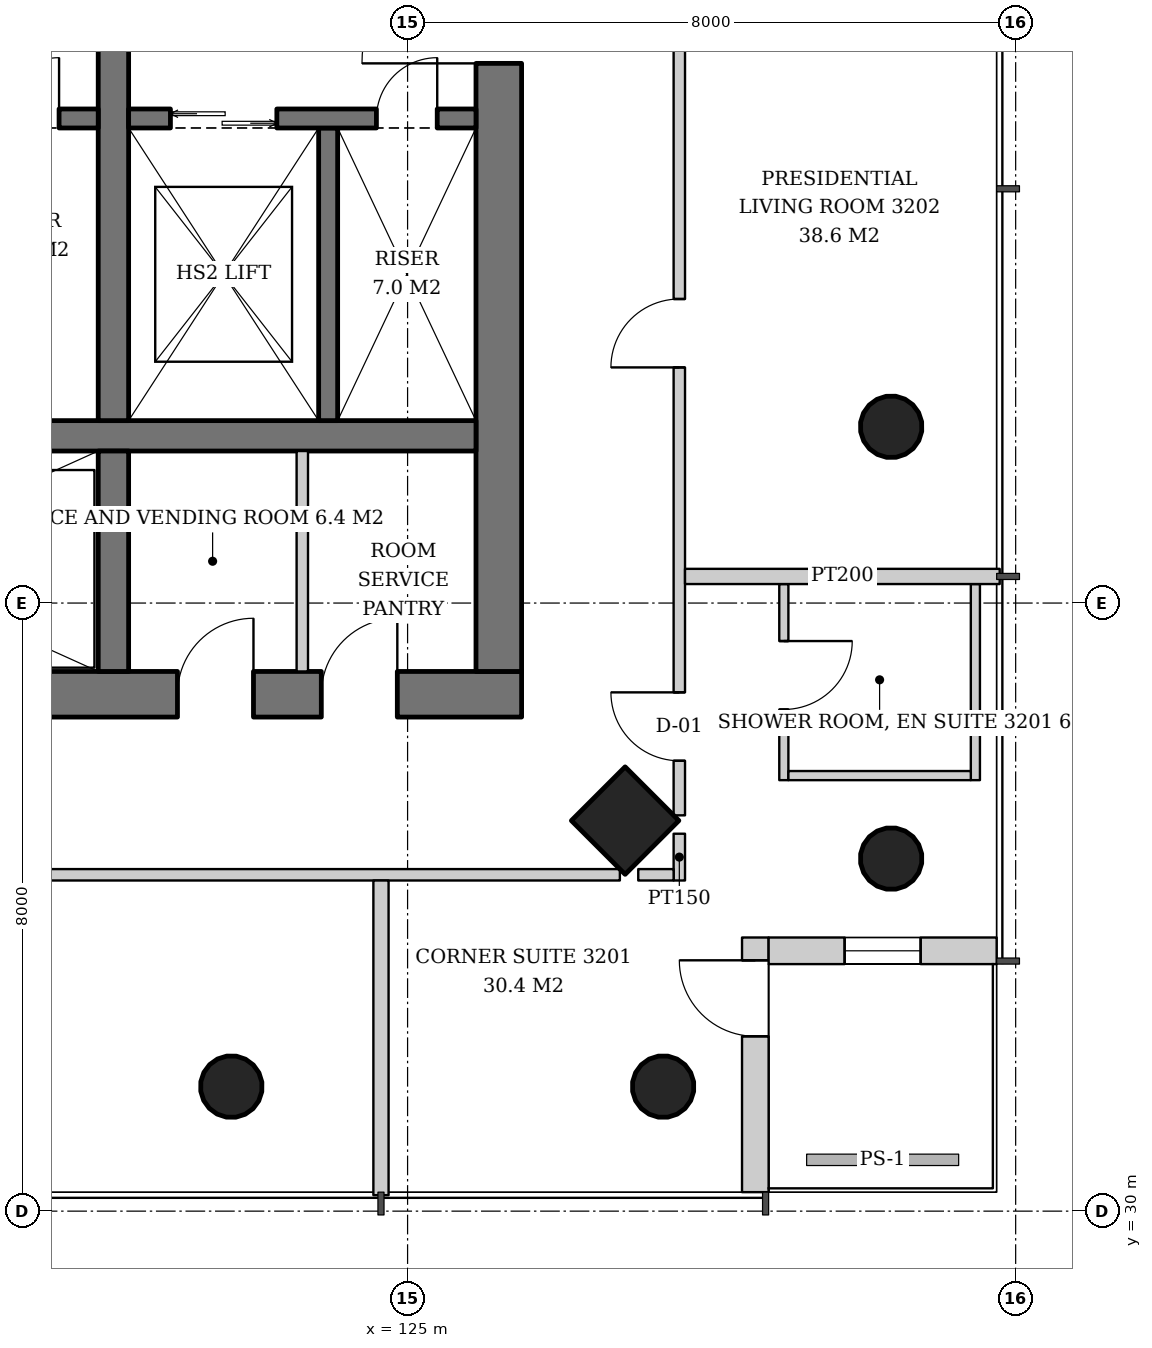
"""IFC4 building model, lengths in metres.
Left out: names, types, materials, properties, quantities, classifications, styles, units other than length and angle.
Written with IfcOpenShell. Run it as: python <this file> out.ifc"""

import sys

from ifc_helpers import new_model, si_unit, direction, frame, frame_2d, origin, origin_2d, place, context, subcontext, project, spatial, rectangle, hollow_circle, extrude, element, fill, save


model = new_model("IFC4")
c1 = context("Model", 3, precision=1e-05, world=origin(), true_north=direction((0.0, 1.0)))
c2 = subcontext(c1, "Body", "Model", "MODEL_VIEW")
j1 = project(units=[si_unit("LENGTHUNIT", "METRE"), si_unit("PLANEANGLEUNIT", "RADIAN")], contexts=[c1])
p1 = place(None, origin())
s1 = spatial("IfcSite", under=j1, at=p1, CompositionType="ELEMENT")
p2 = place(p1, origin())
s2 = spatial("IfcBuilding", under=s1, at=p2, CompositionType="ELEMENT")
p3 = place(p2, frame((0.0, 0.0, 127.4)))
s3 = spatial("IfcBuildingStorey", under=s2, at=p3, CompositionType="ELEMENT", Elevation=127.4)
p4 = place(p3, frame((131.414, 34.586, 0.0), z_axis=(-0.043029647111, 0.043029647111, 0.998146732169), x_axis=(-0.707106781187, -0.707106781187, 0.0)))
e1 = element("IfcColumn", 1, at=p4, inside=s3, PredefinedType="COLUMN", context=c2, shape_type="SweptSolid", body=[
    extrude(hollow_circle(Radius=0.406, WallThickness=0.03, at=origin_2d()), origin(), (0.0, 0.0, 1.0), 3.807),
])
p5 = place(p3, frame((131.414, 40.293, 0.0), z_axis=(-0.043059584825, 0.021497706284, 0.998841188968), x_axis=(-0.446680166538, -0.894693706707, 0.0)))
e2 = element("IfcColumn", 2, at=p5, inside=s3, PredefinedType="COLUMN", context=c2, shape_type="SweptSolid", body=[
    extrude(hollow_circle(Radius=0.406, WallThickness=0.03, at=origin_2d()), origin(), (0.0, 0.0, 1.0), 3.804),
])
p6 = place(p3, frame((127.914, 35.086, 0.0), z_axis=(-0.043029647111, 0.043029647111, 0.998146732169), x_axis=(-0.707106781187, -0.707106781187, 0.0)))
e3 = element("IfcColumn", 3, at=p6, inside=s3, PredefinedType="COLUMN", context=c2, shape_type="SweptSolid", body=[
    extrude(rectangle(XDim=1.0, YDim=1.0, at=origin_2d()), origin(), (0.0, 0.0, 1.0), 3.807),
])
p7 = place(p3, frame((128.414, 31.586, 0.0), z_axis=(-0.043029647111, 0.043029647111, 0.998146732169), x_axis=(-0.707106781187, -0.707106781187, 0.0)))
e4 = element("IfcColumn", 4, at=p7, inside=s3, PredefinedType="COLUMN", context=c2, shape_type="SweptSolid", body=[
    extrude(hollow_circle(Radius=0.406, WallThickness=0.03, at=origin_2d()), origin(), (0.0, 0.0, 1.0), 3.807),
])
p8 = place(p3, frame((122.707, 31.586, 0.0), z_axis=(-0.021497706284, 0.043059584825, 0.998841188968), x_axis=(-0.894693706707, -0.446680166538, 0.0)))
e5 = element("IfcColumn", 5, at=p8, inside=s3, PredefinedType="COLUMN", context=c2, shape_type="SweptSolid", body=[
    extrude(hollow_circle(Radius=0.406, WallThickness=0.03, at=origin_2d()), origin(), (0.0, 0.0, 1.0), 3.804),
])
p9 = place(p3, frame((107.5, 36.8, 0.0), z_axis=(0.0, 0.0, 1.0), x_axis=(1.0, 0.0, 0.0)))
e6 = element("IfcWall", 6, at=p9, inside=s3, PredefinedType="SHEAR", context=c2, shape_type="SweptSolid", body=[
    extrude(rectangle(XDim=19.0, YDim=0.6, at=frame_2d((9.5, 0.0))), origin(), (0.0, 0.0, 1.0), 3.8),
])
p10 = place(p9, frame((3.9, 0.0, 0.0)))
e7 = element("IfcOpeningElement", 7, at=p10, cuts=e6, PredefinedType="OPENING", context=c2, shape_type="SweptSolid", body=[
    extrude(rectangle(XDim=1.0, YDim=2.1, at=frame_2d((0.5, 1.05))), frame((0.0, 0.31, 0.0), z_axis=(0.0, -1.0, 0.0), x_axis=(1.0, 0.0, 0.0)), (0.0, 0.0, 1.0), 0.62),
])
p11 = place(p9, frame((14.472, 0.0, 0.0)))
e8 = element("IfcOpeningElement", 8, at=p11, cuts=e6, PredefinedType="OPENING", context=c2, shape_type="SweptSolid", body=[
    extrude(rectangle(XDim=1.0, YDim=2.1, at=frame_2d((0.5, 1.05))), frame((0.0, 0.31, 0.0), z_axis=(0.0, -1.0, 0.0), x_axis=(1.0, 0.0, 0.0)), (0.0, 0.0, 1.0), 0.62),
])
p12 = place(p9, frame((16.365, 0.0, 0.0)))
e9 = element("IfcOpeningElement", 9, at=p12, cuts=e6, PredefinedType="OPENING", context=c2, shape_type="SweptSolid", body=[
    extrude(rectangle(XDim=1.0, YDim=2.1, at=frame_2d((0.5, 1.05))), frame((0.0, 0.31, 0.0), z_axis=(0.0, -1.0, 0.0), x_axis=(1.0, 0.0, 0.0)), (0.0, 0.0, 1.0), 0.62),
])
p13 = place(p3, frame((126.2, 37.1, 0.0), z_axis=(0.0, 0.0, 1.0), x_axis=(0.0, 1.0, 0.0)))
e10 = element("IfcWall", 10, at=p13, inside=s3, PredefinedType="SHEAR", context=c2, shape_type="SweptSolid", body=[
    extrude(rectangle(XDim=17.8, YDim=0.6, at=frame_2d((8.9, 0.0))), origin(), (0.0, 0.0, 1.0), 3.8),
])
p14 = place(p13, frame((8.0, 0.0, 0.0)))
e11 = element("IfcOpeningElement", 11, at=p14, cuts=e10, PredefinedType="OPENING", context=c2, shape_type="SweptSolid", body=[
    extrude(rectangle(XDim=1.8, YDim=2.4, at=frame_2d((0.9, 1.2))), frame((0.0, 0.31, 0.0), z_axis=(0.0, -1.0, 0.0), x_axis=(1.0, 0.0, 0.0)), (0.0, 0.0, 1.0), 0.62),
])
p15 = place(p3, frame((108.1, 40.2, 0.0), z_axis=(0.0, 0.0, 1.0), x_axis=(1.0, 0.0, 0.0)))
e12 = element("IfcWall", 12, at=p15, inside=s3, PredefinedType="SHEAR", context=c2, shape_type="SweptSolid", body=[
    extrude(rectangle(XDim=17.8, YDim=0.4, at=frame_2d((8.9, 0.0))), origin(), (0.0, 0.0, 1.0), 3.8),
])
p16 = place(p3, frame((121.13, 37.1, 0.0), z_axis=(0.0, 0.0, 1.0), x_axis=(0.0, 1.0, 0.0)))
e13 = element("IfcWall", 13, at=p16, inside=s3, PredefinedType="SHEAR", context=c2, shape_type="SweptSolid", body=[
    extrude(rectangle(XDim=2.9, YDim=0.4, at=frame_2d((1.45, 0.0))), origin(), (0.0, 0.0, 1.0), 3.8),
])
p17 = place(p3, frame((121.13, 40.4, 0.0), z_axis=(0.0, 0.0, 1.0), x_axis=(0.0, 1.0, 0.0)))
e14 = element("IfcWall", 14, at=p17, inside=s3, PredefinedType="SHEAR", context=c2, shape_type="SweptSolid", body=[
    extrude(rectangle(XDim=11.2, YDim=0.4, at=frame_2d((5.6, 0.0))), origin(), (0.0, 0.0, 1.0), 3.8),
])
p18 = place(p3, frame((129.575, 30.25, 0.0), z_axis=(0.0, 0.0, 1.0), x_axis=(0.0, 1.0, 0.0)))
e15 = element("IfcWall", 15, at=p18, inside=s3, PredefinedType="SOLIDWALL", context=c2, shape_type="SweptSolid", body=[
    extrude(rectangle(XDim=3.35, YDim=0.35, at=frame_2d((1.675, 0.0))), origin(), (0.0, 0.0, 1.0), 3.35),
])
p19 = place(p18, frame((2.05, 0.0, 0.0)))
e16 = element("IfcOpeningElement", 16, at=p19, cuts=e15, PredefinedType="OPENING", context=c2, shape_type="SweptSolid", body=[
    extrude(rectangle(XDim=1.0, YDim=2.4, at=frame_2d((0.5, 1.2))), frame((0.0, 0.185, 0.0), z_axis=(0.0, -1.0, 0.0), x_axis=(1.0, 0.0, 0.0)), (0.0, 0.0, 1.0), 0.37),
])
p20 = place(p3, frame((129.75, 33.425, 0.0), z_axis=(0.0, 0.0, 1.0), x_axis=(1.0, 0.0, 0.0)))
e17 = element("IfcWall", 17, at=p20, inside=s3, PredefinedType="SOLIDWALL", context=c2, shape_type="SweptSolid", body=[
    extrude(rectangle(XDim=3.0, YDim=0.35, at=frame_2d((1.5, 0.0))), origin(), (0.0, 0.0, 1.0), 3.35),
])
p21 = place(p20, frame((1.0, 0.0, 0.65)))
e18 = element("IfcOpeningElement", 18, at=p21, cuts=e17, PredefinedType="OPENING", context=c2, shape_type="SweptSolid", body=[
    extrude(rectangle(XDim=1.0, YDim=2.4, at=frame_2d((0.5, 1.2))), frame((0.0, 0.185, 0.0), z_axis=(0.0, -1.0, 0.0), x_axis=(1.0, 0.0, 0.0)), (0.0, 0.0, 1.0), 0.37),
])
p22 = place(p3, frame((108.1, 44.375, 0.0), z_axis=(0.0, 0.0, 1.0), x_axis=(1.0, 0.0, 0.0)))
e19 = element("IfcWall", 19, at=p22, inside=s3, PredefinedType="SHEAR", context=c2, shape_type="SweptSolid", body=[
    extrude(rectangle(XDim=12.83, YDim=0.25, at=frame_2d((6.415, 0.0))), origin(), (0.0, 0.0, 1.0), 3.8),
])
p23 = place(p22, frame((0.7, 0.0, 0.0)))
e20 = element("IfcOpeningElement", 20, at=p23, cuts=e19, PredefinedType="OPENING", context=c2, shape_type="SweptSolid", body=[
    extrude(rectangle(XDim=1.1, YDim=2.2, at=frame_2d((0.55, 1.1))), frame((0.0, 0.135, 0.0), z_axis=(0.0, -1.0, 0.0), x_axis=(1.0, 0.0, 0.0)), (0.0, 0.0, 1.0), 0.27),
])
p24 = place(p22, frame((3.45, 0.0, 0.0)))
e21 = element("IfcOpeningElement", 21, at=p24, cuts=e19, PredefinedType="OPENING", context=c2, shape_type="SweptSolid", body=[
    extrude(rectangle(XDim=1.1, YDim=2.2, at=frame_2d((0.55, 1.1))), frame((0.0, 0.135, 0.0), z_axis=(0.0, -1.0, 0.0), x_axis=(1.0, 0.0, 0.0)), (0.0, 0.0, 1.0), 0.27),
])
p25 = place(p22, frame((6.2, 0.0, 0.0)))
e22 = element("IfcOpeningElement", 22, at=p25, cuts=e19, PredefinedType="OPENING", context=c2, shape_type="SweptSolid", body=[
    extrude(rectangle(XDim=1.1, YDim=2.2, at=frame_2d((0.55, 1.1))), frame((0.0, 0.135, 0.0), z_axis=(0.0, -1.0, 0.0), x_axis=(1.0, 0.0, 0.0)), (0.0, 0.0, 1.0), 0.27),
])
p26 = place(p22, frame((9.0, 0.0, 0.0)))
e23 = element("IfcOpeningElement", 23, at=p26, cuts=e19, PredefinedType="OPENING", context=c2, shape_type="SweptSolid", body=[
    extrude(rectangle(XDim=1.0, YDim=2.1, at=frame_2d((0.5, 1.05))), frame((0.0, 0.135, 0.0), z_axis=(0.0, -1.0, 0.0), x_axis=(1.0, 0.0, 0.0)), (0.0, 0.0, 1.0), 0.27),
])
p27 = place(p22, frame((11.515, 0.0, 0.0)))
e24 = element("IfcOpeningElement", 24, at=p27, cuts=e19, PredefinedType="OPENING", context=c2, shape_type="SweptSolid", body=[
    extrude(rectangle(XDim=0.8, YDim=2.0, at=frame_2d((0.4, 1.0))), frame((0.0, 0.135, 0.0), z_axis=(0.0, -1.0, 0.0), x_axis=(1.0, 0.0, 0.0)), (0.0, 0.0, 1.0), 0.27),
])
p28 = place(p3, frame((123.955, 44.25, 0.0), z_axis=(0.0, 0.0, 1.0), x_axis=(0.0, -1.0, 0.0)))
e25 = element("IfcWall", 25, at=p28, inside=s3, PredefinedType="SHEAR", context=c2, shape_type="SweptSolid", body=[
    extrude(rectangle(XDim=3.85, YDim=0.25, at=frame_2d((1.925, 0.0))), origin(), (0.0, 0.0, 1.0), 3.8),
])
p29 = place(p3, frame((121.33, 44.375, 0.0), z_axis=(0.0, 0.0, 1.0), x_axis=(1.0, 0.0, 0.0)))
e26 = element("IfcWall", 26, at=p29, inside=s3, PredefinedType="SHEAR", context=c2, shape_type="SweptSolid", body=[
    extrude(rectangle(XDim=4.57, YDim=0.25, at=frame_2d((2.285, 0.0))), origin(), (0.0, 0.0, 1.0), 3.8),
])
p30 = place(p29, frame((0.55, 0.0, 0.0)))
e27 = element("IfcOpeningElement", 27, at=p30, cuts=e26, PredefinedType="OPENING", context=c2, shape_type="SweptSolid", body=[
    extrude(rectangle(XDim=1.4, YDim=2.4, at=frame_2d((0.7, 1.2))), frame((0.0, 0.135, 0.0), z_axis=(0.0, -1.0, 0.0), x_axis=(1.0, 0.0, 0.0)), (0.0, 0.0, 1.0), 0.27),
])
p31 = place(p29, frame((3.26, 0.0, 0.0)))
e28 = element("IfcOpeningElement", 28, at=p31, cuts=e26, PredefinedType="OPENING", context=c2, shape_type="SweptSolid", body=[
    extrude(rectangle(XDim=0.8, YDim=2.0, at=frame_2d((0.4, 1.0))), frame((0.0, 0.135, 0.0), z_axis=(0.0, -1.0, 0.0), x_axis=(1.0, 0.0, 0.0)), (0.0, 0.0, 1.0), 0.27),
])
p32 = place(p3, frame((123.615, 37.1, 0.0), z_axis=(0.0, 0.0, 1.0), x_axis=(0.0, 1.0, 0.0)))
e29 = element("IfcWall", 29, at=p32, inside=s3, PredefinedType="SOLIDWALL", context=c2, shape_type="SweptSolid", body=[
    extrude(rectangle(XDim=2.9, YDim=0.15, at=frame_2d((1.45, 0.0))), origin(), (0.0, 0.0, 1.0), 3.35),
])
p33 = place(p3, frame((129.95, 38.25, 0.0), z_axis=(0.0, 0.0, 1.0), x_axis=(0.0, -1.0, 0.0)))
e30 = element("IfcWall", 30, at=p33, inside=s3, PredefinedType="PARTITIONING", context=c2, shape_type="SweptSolid", body=[
    extrude(rectangle(XDim=2.58, YDim=0.12, at=frame_2d((1.29, 0.0))), origin(), (0.0, 0.0, 1.0), 2.338),
])
p34 = place(p33, frame((0.75, 0.0, 0.0)))
e31 = element("IfcOpeningElement", 31, at=p34, cuts=e30, PredefinedType="OPENING", context=c2, shape_type="SweptSolid", body=[
    extrude(rectangle(XDim=0.9, YDim=2.1, at=frame_2d((0.45, 1.05))), frame((0.0, 0.07, 0.0), z_axis=(0.0, -1.0, 0.0), x_axis=(1.0, 0.0, 0.0)), (0.0, 0.0, 1.0), 0.14),
])
p35 = place(p3, frame((132.47, 38.25, 0.0), z_axis=(0.0, 0.0, 1.0), x_axis=(0.0, -1.0, 0.0)))
e32 = element("IfcWall", 32, at=p35, inside=s3, PredefinedType="PARTITIONING", context=c2, shape_type="SweptSolid", body=[
    extrude(rectangle(XDim=2.58, YDim=0.12, at=frame_2d((1.29, 0.0))), origin(), (0.0, 0.0, 1.0), 3.35),
])
p36 = place(p3, frame((130.01, 35.73, 0.0), z_axis=(0.0, 0.0, 1.0), x_axis=(1.0, 0.0, 0.0)))
e33 = element("IfcWall", 33, at=p36, inside=s3, PredefinedType="PARTITIONING", context=c2, shape_type="SweptSolid", body=[
    extrude(rectangle(XDim=2.4, YDim=0.12, at=frame_2d((1.2, 0.0))), origin(), (0.0, 0.0, 1.0), 2.35),
])
p37 = place(p3, frame((128.575, 34.35, 0.0), z_axis=(0.0, 0.0, 1.0), x_axis=(0.0, 1.0, 0.0)))
e34 = element("IfcWall", 34, at=p37, inside=s3, PredefinedType="PARTITIONING", context=c2, shape_type="SweptSolid", body=[
    extrude(rectangle(XDim=0.615, YDim=0.15, at=frame_2d((0.308, 0.0))), origin(), (0.0, 0.0, 1.0), 3.35),
])
p38 = place(p3, frame((128.575, 35.207, 0.0), z_axis=(0.0, 0.0, 1.0), x_axis=(0.0, 1.0, 0.0)))
e35 = element("IfcWall", 35, at=p38, inside=s3, PredefinedType="PARTITIONING", context=c2, shape_type="SweptSolid", body=[
    extrude(rectangle(XDim=21.586, YDim=0.15, at=frame_2d((10.793, 0.0))), origin(), (0.0, 0.0, 1.0), 2.338),
])
p39 = place(p38, frame((0.718, 0.0, 0.0)))
e36 = element("IfcOpeningElement", 36, at=p39, cuts=e35, PredefinedType="OPENING", context=c2, shape_type="SweptSolid", body=[
    extrude(rectangle(XDim=0.9, YDim=2.1, at=frame_2d((0.45, 1.05))), frame((0.0, 0.085, 0.0), z_axis=(0.0, -1.0, 0.0), x_axis=(1.0, 0.0, 0.0)), (0.0, 0.0, 1.0), 0.17),
])
p40 = place(p38, frame((5.893, 0.0, 0.0)))
e37 = element("IfcOpeningElement", 37, at=p40, cuts=e35, PredefinedType="OPENING", context=c2, shape_type="SweptSolid", body=[
    extrude(rectangle(XDim=0.9, YDim=2.1, at=frame_2d((0.45, 1.05))), frame((0.0, 0.085, 0.0), z_axis=(0.0, -1.0, 0.0), x_axis=(1.0, 0.0, 0.0)), (0.0, 0.0, 1.0), 0.17),
])
p41 = place(p3, frame((128.65, 38.35, 0.0), z_axis=(0.0, 0.0, 1.0), x_axis=(1.0, 0.0, 0.0)))
e38 = element("IfcWall", 38, at=p41, inside=s3, PredefinedType="PARTITIONING", context=c2, shape_type="SweptSolid", body=[
    extrude(rectangle(XDim=4.14, YDim=0.2, at=frame_2d((2.07, 0.0))), origin(), (0.0, 0.0, 1.0), 2.35),
])
p42 = place(p3, frame((106.207, 34.425, 0.0), z_axis=(0.0, 0.0, 1.0), x_axis=(1.0, 0.0, 0.0)))
e39 = element("IfcWall", 39, at=p42, inside=s3, PredefinedType="PARTITIONING", context=c2, shape_type="SweptSolid", body=[
    extrude(rectangle(XDim=21.586, YDim=0.15, at=frame_2d((10.793, 0.0))), origin(), (0.0, 0.0, 1.0), 2.338),
])
p43 = place(p42, frame((0.718, 0.0, 0.0)))
e40 = element("IfcOpeningElement", 40, at=p43, cuts=e39, PredefinedType="OPENING", context=c2, shape_type="SweptSolid", body=[
    extrude(rectangle(XDim=0.9, YDim=2.1, at=frame_2d((0.45, 1.05))), frame((0.0, 0.085, 0.0), z_axis=(0.0, -1.0, 0.0), x_axis=(1.0, 0.0, 0.0)), (0.0, 0.0, 1.0), 0.17),
])
p44 = place(p42, frame((5.843, 0.0, 0.0)))
e41 = element("IfcOpeningElement", 41, at=p44, cuts=e39, PredefinedType="OPENING", context=c2, shape_type="SweptSolid", body=[
    extrude(rectangle(XDim=1.0, YDim=2.1, at=frame_2d((0.5, 1.05))), frame((0.0, 0.085, 0.0), z_axis=(0.0, -1.0, 0.0), x_axis=(1.0, 0.0, 0.0)), (0.0, 0.0, 1.0), 0.17),
])
p45 = place(p3, frame((128.035, 34.425, 0.0), z_axis=(0.0, 0.0, 1.0), x_axis=(1.0, 0.0, 0.0)))
e42 = element("IfcWall", 42, at=p45, inside=s3, PredefinedType="PARTITIONING", context=c2, shape_type="SweptSolid", body=[
    extrude(rectangle(XDim=0.465, YDim=0.15, at=frame_2d((0.233, 0.0))), origin(), (0.0, 0.0, 1.0), 3.35),
])
p46 = place(p3, frame((124.65, 34.35, 0.0), z_axis=(0.0, 0.0, 1.0), x_axis=(0.0, -1.0, 0.0)))
e43 = element("IfcWall", 43, at=p46, inside=s3, PredefinedType="PARTITIONING", context=c2, shape_type="SweptSolid", body=[
    extrude(rectangle(XDim=4.14, YDim=0.2, at=frame_2d((2.07, 0.0))), origin(), (0.0, 0.0, 1.0), 2.35),
])
p47 = place(p19, origin())
e44 = element("IfcDoor", 44, at=p47, inside=s3, OperationType="SINGLE_SWING_RIGHT", PredefinedType="DOOR", context=c2, shape_type="SweptSolid", body=[
    extrude(rectangle(XDim=1.0, YDim=2.4, at=frame_2d((0.5, 1.2))), frame((0.0, 0.025, 0.0), z_axis=(0.0, -1.0, 0.0), x_axis=(1.0, 0.0, 0.0)), (0.0, 0.0, 1.0), 0.05),
])
fill(e16, e44)
p48 = place(p21, origin())
e45 = element("IfcWindow", 45, at=p48, inside=s3, PartitioningType="SINGLE_PANEL", PredefinedType="WINDOW", context=c2, shape_type="SweptSolid", body=[
    extrude(rectangle(XDim=1.0, YDim=2.4, at=frame_2d((0.5, 1.2))), frame((0.0, 0.03, 0.0), z_axis=(0.0, -1.0, 0.0), x_axis=(1.0, 0.0, 0.0)), (0.0, 0.0, 1.0), 0.06),
])
fill(e18, e45)
p49 = place(p27, origin())
e46 = element("IfcDoor", 46, at=p49, inside=s3, OperationType="SINGLE_SWING_RIGHT", PredefinedType="DOOR", context=c2, shape_type="SweptSolid", body=[
    extrude(rectangle(XDim=0.8, YDim=2.0, at=frame_2d((0.4, 1.0))), frame((0.0, 0.025, 0.0), z_axis=(0.0, -1.0, 0.0), x_axis=(1.0, 0.0, 0.0)), (0.0, 0.0, 1.0), 0.05),
])
fill(e24, e46)
p50 = place(p30, origin())
e47 = element("IfcDoor", 47, at=p50, inside=s3, OperationType="DOUBLE_DOOR_SLIDING", PredefinedType="DOOR", context=c2, shape_type="SweptSolid", body=[
    extrude(rectangle(XDim=1.4, YDim=2.4, at=frame_2d((0.7, 1.2))), frame((0.0, 0.025, 0.0), z_axis=(0.0, -1.0, 0.0), x_axis=(1.0, 0.0, 0.0)), (0.0, 0.0, 1.0), 0.05),
])
fill(e27, e47)
p51 = place(p31, origin())
e48 = element("IfcDoor", 48, at=p51, inside=s3, OperationType="SINGLE_SWING_RIGHT", PredefinedType="DOOR", context=c2, shape_type="SweptSolid", body=[
    extrude(rectangle(XDim=0.8, YDim=2.0, at=frame_2d((0.4, 1.0))), frame((0.0, 0.025, 0.0), z_axis=(0.0, -1.0, 0.0), x_axis=(1.0, 0.0, 0.0)), (0.0, 0.0, 1.0), 0.05),
])
fill(e28, e48)
p52 = place(p14, origin())
e49 = element("IfcDoor", 49, at=p52, inside=s3, OperationType="DOUBLE_DOOR_SINGLE_SWING", PredefinedType="DOOR", context=c2, shape_type="SweptSolid", body=[
    extrude(rectangle(XDim=1.8, YDim=2.4, at=frame_2d((0.9, 1.2))), frame((0.0, 0.025, 0.0), z_axis=(0.0, -1.0, 0.0), x_axis=(1.0, 0.0, 0.0)), (0.0, 0.0, 1.0), 0.05),
])
fill(e11, e49)
p53 = place(p11, origin())
e50 = element("IfcDoor", 50, at=p53, inside=s3, OperationType="SINGLE_SWING_RIGHT", PredefinedType="DOOR", context=c2, shape_type="SweptSolid", body=[
    extrude(rectangle(XDim=1.0, YDim=2.1, at=frame_2d((0.5, 1.05))), frame((0.0, 0.29, 0.0), z_axis=(0.0, -1.0, 0.0), x_axis=(1.0, 0.0, 0.0)), (0.0, 0.0, 1.0), 0.05),
])
fill(e8, e50)
p54 = place(p12, origin())
e51 = element("IfcDoor", 51, at=p54, inside=s3, OperationType="SINGLE_SWING_RIGHT", PredefinedType="DOOR", context=c2, shape_type="SweptSolid", body=[
    extrude(rectangle(XDim=1.0, YDim=2.1, at=frame_2d((0.5, 1.05))), frame((0.0, 0.29, 0.0), z_axis=(0.0, -1.0, 0.0), x_axis=(1.0, 0.0, 0.0)), (0.0, 0.0, 1.0), 0.05),
])
fill(e9, e51)
p55 = place(p34, origin())
e52 = element("IfcDoor", 52, at=p55, inside=s3, OperationType="SINGLE_SWING_LEFT", PredefinedType="DOOR", context=c2, shape_type="SweptSolid", body=[
    extrude(rectangle(XDim=0.9, YDim=2.1, at=frame_2d((0.45, 1.05))), frame((0.0, 0.025, 0.0), z_axis=(0.0, -1.0, 0.0), x_axis=(1.0, 0.0, 0.0)), (0.0, 0.0, 1.0), 0.05),
])
fill(e31, e52)
p56 = place(p39, origin())
e53 = element("IfcDoor", 53, at=p56, inside=s3, OperationType="SINGLE_SWING_RIGHT", PredefinedType="DOOR", context=c2, shape_type="SweptSolid", body=[
    extrude(rectangle(XDim=0.9, YDim=2.1, at=frame_2d((0.45, 1.05))), frame((0.0, 0.025, 0.0), z_axis=(0.0, -1.0, 0.0), x_axis=(1.0, 0.0, 0.0)), (0.0, 0.0, 1.0), 0.05),
])
fill(e36, e53)
p57 = place(p40, origin())
e54 = element("IfcDoor", 54, at=p57, inside=s3, OperationType="SINGLE_SWING_LEFT", PredefinedType="DOOR", context=c2, shape_type="SweptSolid", body=[
    extrude(rectangle(XDim=0.9, YDim=2.1, at=frame_2d((0.45, 1.05))), frame((0.0, 0.025, 0.0), z_axis=(0.0, -1.0, 0.0), x_axis=(1.0, 0.0, 0.0)), (0.0, 0.0, 1.0), 0.05),
])
fill(e37, e54)
save(model, sys.argv[1])
